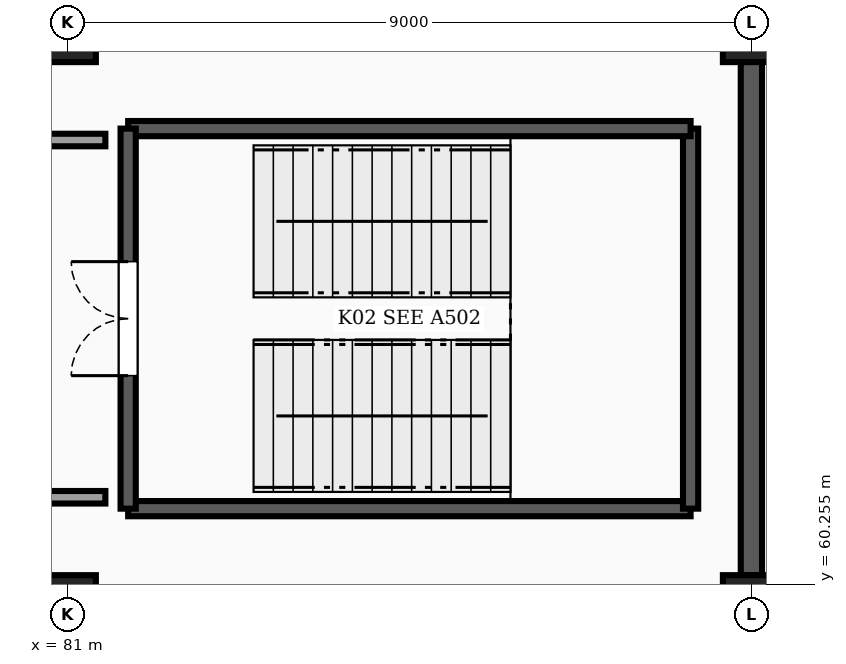
"""IFC4 building model, lengths in metres.
Left out: names, types, materials, properties, quantities, classifications, styles, units other than length and angle.
Written with IfcOpenShell. Run it as: python <this file> out.ifc"""

import sys

from ifc_helpers import new_model, si_unit, direction, frame, frame_2d, origin, origin_2d, place, context, subcontext, project, spatial, rectangle, extrude, element, fill, save


model = new_model("IFC4")
c1 = context("Model", 3, precision=1e-05, world=origin(), true_north=direction((0.0, 1.0)))
c2 = subcontext(c1, "Body", "Model", "MODEL_VIEW")
j1 = project(units=[si_unit("LENGTHUNIT", "METRE"), si_unit("PLANEANGLEUNIT", "RADIAN")], contexts=[c1])
p1 = place(None, origin())
s1 = spatial("IfcSite", under=j1, at=p1, CompositionType="ELEMENT")
p2 = place(p1, origin())
s2 = spatial("IfcBuilding", under=s1, at=p2, CompositionType="ELEMENT")
p3 = place(p2, origin())
s3 = spatial("IfcBuildingStorey", under=s2, at=p3, CompositionType="ELEMENT", Elevation=0.0)
for number, where, z_axis, x_axis in (
    (1, (81.0, 60.0, -0.25), (0.0, 0.0, 1.0), (1.0, 0.0, 0.0)),
    (2, (90.0, 60.0, -0.25), (0.0, 0.0, 1.0), (1.0, 0.0, 0.0)),
    (3, (81.0, 67.5, -0.25), (0.0, 0.0, 1.0), (1.0, 0.0, 0.0)),
    (4, (90.0, 67.5, -0.25), (0.0, 0.0, 1.0), (1.0, 0.0, 0.0)),
):
    element("IfcColumn", number, at=place(p3, frame(where, z_axis=z_axis, x_axis=x_axis)), inside=s3, PredefinedType="COLUMN", context=c2, shape_type="SweptSolid", body=[
        extrude(rectangle(XDim=0.75, YDim=0.75, at=origin_2d()), origin(), (0.0, 0.0, 1.0), 4.75),
    ])
p4 = place(p3, frame((90.0, 67.129, 0.0), z_axis=(0.0, 0.0, 1.0), x_axis=(0.0, -1.0, 0.0)))
e5 = element("IfcWall", 5, at=p4, inside=s3, PredefinedType="SOLIDWALL", context=c2, shape_type="SweptSolid", body=[
    extrude(rectangle(XDim=6.758, YDim=0.28, at=frame_2d((3.379, 0.0))), origin(), (0.0, 0.0, 1.0), 3.322),
])
p5 = place(p3, frame((81.8, 61.25, 0.0), z_axis=(0.0, 0.0, 1.0), x_axis=(1.0, 0.0, 0.0)))
e6 = element("IfcWall", 6, at=p5, inside=s3, PredefinedType="SHEAR", context=c2, shape_type="SweptSolid", body=[
    extrude(rectangle(XDim=7.4, YDim=0.2, at=frame_2d((3.7, 0.0))), origin(), (0.0, 0.0, 1.0), 4.08),
])
p6 = place(p3, frame((89.2, 61.25, 0.0), z_axis=(0.0, 0.0, 1.0), x_axis=(0.0, 1.0, 0.0)))
e7 = element("IfcWall", 7, at=p6, inside=s3, PredefinedType="SHEAR", context=c2, shape_type="SweptSolid", body=[
    extrude(rectangle(XDim=5.0, YDim=0.2, at=frame_2d((2.5, 0.0))), origin(), (0.0, 0.0, 1.0), 4.08),
])
p7 = place(p3, frame((89.2, 66.25, 0.0), z_axis=(0.0, 0.0, 1.0), x_axis=(-1.0, 0.0, 0.0)))
e8 = element("IfcWall", 8, at=p7, inside=s3, PredefinedType="SHEAR", context=c2, shape_type="SweptSolid", body=[
    extrude(rectangle(XDim=7.4, YDim=0.2, at=frame_2d((3.7, 0.0))), origin(), (0.0, 0.0, 1.0), 4.08),
])
p8 = place(p3, frame((81.8, 61.25, 0.0), z_axis=(0.0, 0.0, 1.0), x_axis=(0.0, 1.0, 0.0)))
e9 = element("IfcWall", 9, at=p8, inside=s3, PredefinedType="SHEAR", context=c2, shape_type="SweptSolid", body=[
    extrude(rectangle(XDim=5.0, YDim=0.2, at=frame_2d((2.5, 0.0))), origin(), (0.0, 0.0, 1.0), 4.08),
])
p9 = place(p8, frame((1.75, 0.0, 0.0)))
e10 = element("IfcOpeningElement", 10, at=p9, cuts=e9, PredefinedType="OPENING", context=c2, shape_type="SweptSolid", body=[
    extrude(rectangle(XDim=1.5, YDim=2.15, at=frame_2d((0.75, 1.075))), frame((0.0, 0.11, 0.0), z_axis=(0.0, -1.0, 0.0), x_axis=(1.0, 0.0, 0.0)), (0.0, 0.0, 1.0), 0.22),
])
for number, where, z_axis, x_axis in (
    (11, (81.5, 61.4, 0.0), (0.0, 0.0, 1.0), (-1.0, 0.0, 0.0)),
    (12, (78.16, 66.1, 0.0), (0.0, 0.0, 1.0), (1.0, 0.0, 0.0)),
):
    element("IfcWall", number, at=place(p3, frame(where, z_axis=z_axis, x_axis=x_axis)), inside=s3, PredefinedType="PARTITIONING", context=c2, shape_type="SweptSolid", body=[
        extrude(rectangle(XDim=3.34, YDim=0.165, at=frame_2d((1.67, 0.0))), origin(), (0.0, 0.0, 1.0), 4.08),
    ])
p10 = place(p9, origin())
e13 = element("IfcDoor", 13, at=p10, inside=s3, OperationType="DOUBLE_DOOR_SINGLE_SWING", PredefinedType="DOOR", context=c2, shape_type="SweptSolid", body=[
    extrude(rectangle(XDim=1.5, YDim=2.15, at=frame_2d((0.75, 1.075))), frame((0.0, 0.025, 0.0), z_axis=(0.0, -1.0, 0.0), x_axis=(1.0, 0.0, 0.0)), (0.0, 0.0, 1.0), 0.05),
])
fill(e10, e13)
save(model, sys.argv[1])
